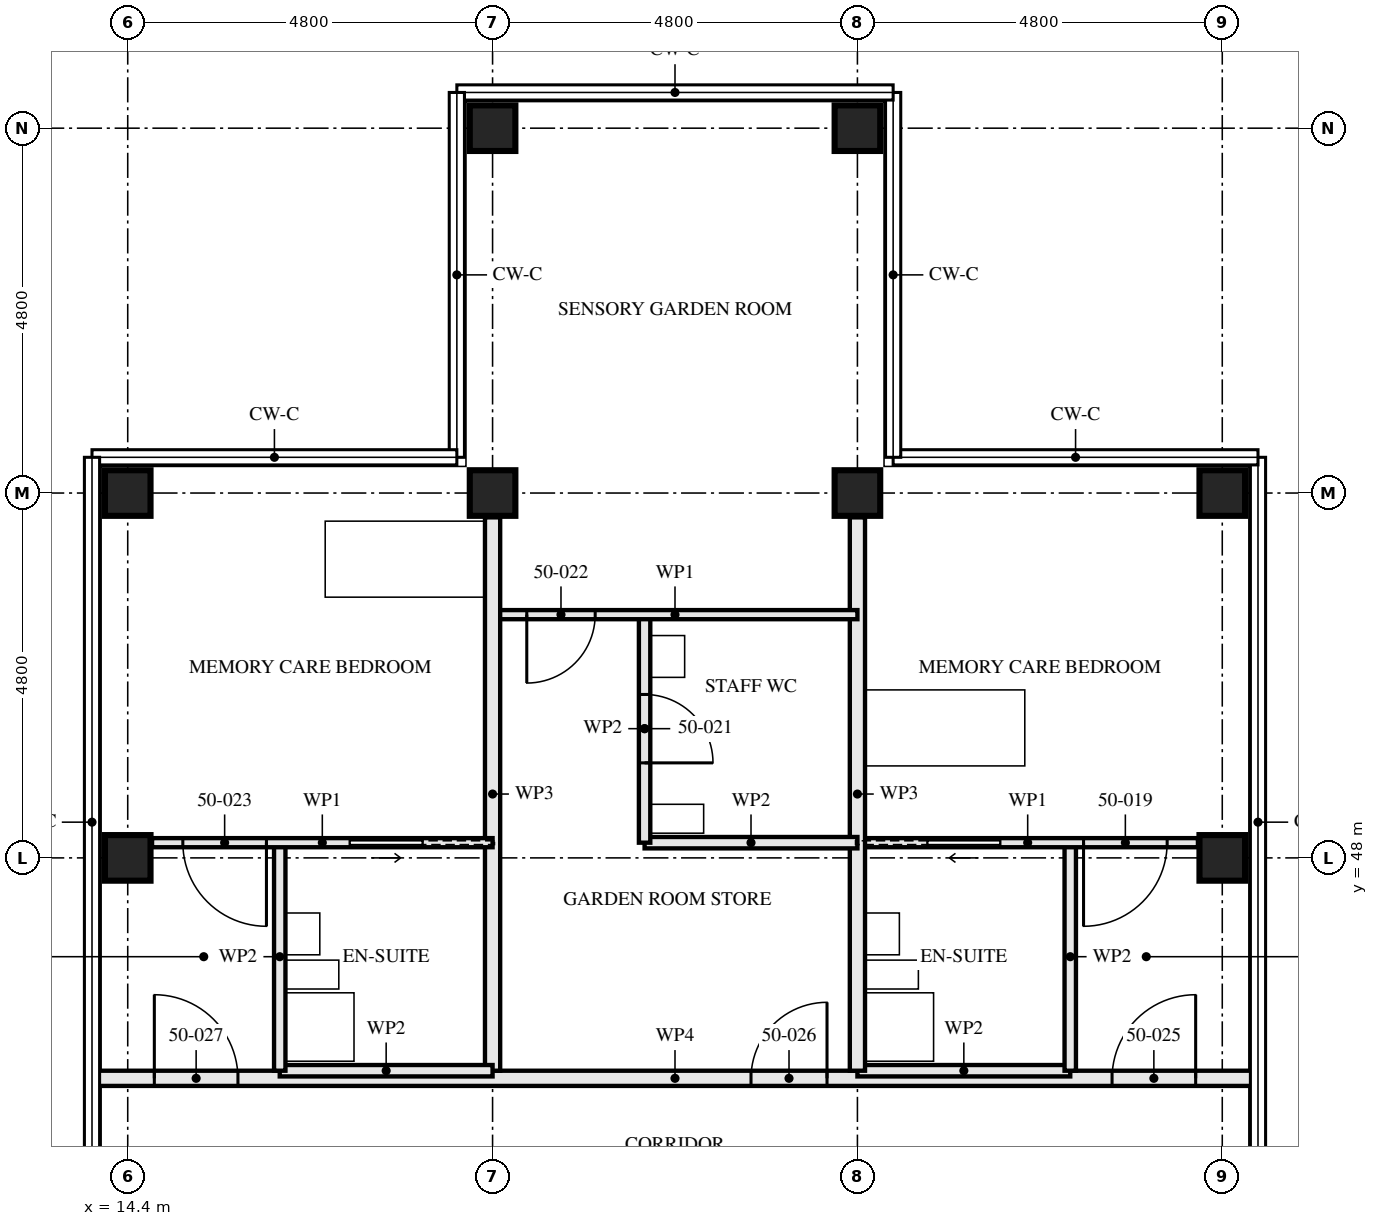
"""IFC4 building model, lengths in metres.
Left out: names, types, materials, properties, quantities, classifications, styles, units other than length and angle.
Written with IfcOpenShell. Run it as: python <this file> out.ifc"""

import sys

from ifc_helpers import new_model, si_unit, direction, frame, frame_2d, origin, origin_2d, place, context, subcontext, project, spatial, rectangle, hollow_rectangle, extrude, element, fill, save


model = new_model("IFC4")
c1 = context("Model", 3, precision=1e-05, world=origin(), true_north=direction((0.0, 1.0)))
c2 = subcontext(c1, "Body", "Model", "MODEL_VIEW")
j1 = project(units=[si_unit("LENGTHUNIT", "METRE"), si_unit("PLANEANGLEUNIT", "RADIAN")], contexts=[c1])
p1 = place(None, origin())
s1 = spatial("IfcSite", under=j1, at=p1, CompositionType="ELEMENT")
p2 = place(p1, origin())
s2 = spatial("IfcBuilding", under=s1, at=p2, CompositionType="ELEMENT")
p3 = place(p2, frame((0.0, 0.0, 183.0)))
s3 = spatial("IfcBuildingStorey", under=s2, at=p3, CompositionType="ELEMENT", Elevation=183.0)
for number, where, z_axis, x_axis in (
    (1, (14.4, 48.0, 0.0), (0.0, 0.0, 1.0), (1.0, 0.0, 0.0)),
    (2, (14.4, 52.8, 0.0), (0.0, 0.0, 1.0), (0.0, 1.0, 0.0)),
    (3, (19.2, 52.8, 0.0), (0.0, 0.0, 1.0), (0.0, 1.0, 0.0)),
    (4, (19.2, 57.6, 0.0), (0.0, 0.0, 1.0), (0.0, 1.0, 0.0)),
    (5, (24.0, 52.8, 0.0), (0.0, 0.0, 1.0), (0.0, 1.0, 0.0)),
    (6, (24.0, 57.6, 0.0), (0.0, 0.0, 1.0), (0.0, 1.0, 0.0)),
    (7, (28.8, 48.0, 0.0), (0.0, 0.0, 1.0), (1.0, 0.0, 0.0)),
    (8, (28.8, 52.8, 0.0), (0.0, 0.0, 1.0), (0.0, 1.0, 0.0)),
):
    element("IfcColumn", number, at=place(p3, frame(where, z_axis=z_axis, x_axis=x_axis)), inside=s3, PredefinedType="COLUMN", context=c2, shape_type="SweptSolid", body=[
        extrude(hollow_rectangle(XDim=0.6, YDim=0.6, WallThickness=0.08, at=origin_2d()), origin(), (0.0, 0.0, 1.0), 3.5),
    ])
p4 = place(p3, frame((26.8, 48.2, 0.0), z_axis=(0.0, 0.0, 1.0), x_axis=(0.0, -1.0, 0.0)))
e9 = element("IfcWall", 9, at=p4, inside=s3, PredefinedType="PARTITIONING", context=c2, shape_type="SweptSolid", body=[
    extrude(rectangle(XDim=3.0, YDim=0.15, at=frame_2d((1.5, 0.0))), origin(), (0.0, 0.0, 1.0), 2.55),
])
p5 = place(p3, frame((26.8, 45.2, 0.0), z_axis=(0.0, 0.0, 1.0), x_axis=(-1.0, 0.0, 0.0)))
e10 = element("IfcWall", 10, at=p5, inside=s3, PredefinedType="PARTITIONING", context=c2, shape_type="SweptSolid", body=[
    extrude(rectangle(XDim=2.8, YDim=0.15, at=frame_2d((1.4, 0.0))), origin(), (0.0, 0.0, 1.0), 3.33),
])
p6 = place(p3, frame((28.48, 48.2, 0.0), z_axis=(0.0, 0.0, 1.0), x_axis=(-1.0, 0.0, 0.0)))
e11 = element("IfcWall", 11, at=p6, inside=s3, PredefinedType="PARTITIONING", context=c2, shape_type="SweptSolid", body=[
    extrude(rectangle(XDim=4.48, YDim=0.12, at=frame_2d((2.24, 0.0))), origin(), (0.0, 0.0, 1.0), 3.33),
])
p7 = place(p6, frame((0.405, 0.0, 0.0)))
e12 = element("IfcOpeningElement", 12, at=p7, cuts=e11, PredefinedType="OPENING", context=c2, shape_type="SweptSolid", body=[
    extrude(rectangle(XDim=1.1, YDim=2.1, at=frame_2d((0.55, 1.05))), frame((0.0, 0.071, 0.0), z_axis=(0.0, -1.0, 0.0), x_axis=(1.0, 0.0, 0.0)), (0.0, 0.0, 1.0), 0.141),
])
p8 = place(p6, frame((2.605, 0.0, 0.0)))
e13 = element("IfcOpeningElement", 13, at=p8, cuts=e11, PredefinedType="OPENING", context=c2, shape_type="SweptSolid", body=[
    extrude(rectangle(XDim=0.95, YDim=2.1, at=frame_2d((0.475, 1.05))), frame((0.0, 0.071, 0.0), z_axis=(0.0, -1.0, 0.0), x_axis=(1.0, 0.0, 0.0)), (0.0, 0.0, 1.0), 0.141),
])
p9 = place(p3, frame((24.0, 52.48, 0.0), z_axis=(0.0, 0.0, 1.0), x_axis=(0.0, -1.0, 0.0)))
e14 = element("IfcWall", 14, at=p9, inside=s3, PredefinedType="PARTITIONING", context=c2, shape_type="SweptSolid", body=[
    extrude(rectangle(XDim=7.28, YDim=0.2, at=frame_2d((3.64, 0.0))), origin(), (0.0, 0.0, 1.0), 2.55),
])
p10 = place(p3, frame((21.2, 51.2, 0.0), z_axis=(0.0, 0.0, 1.0), x_axis=(0.0, -1.0, 0.0)))
e15 = element("IfcWall", 15, at=p10, inside=s3, PredefinedType="PARTITIONING", context=c2, shape_type="SweptSolid", body=[
    extrude(rectangle(XDim=3.0, YDim=0.15, at=frame_2d((1.5, 0.0))), origin(), (0.0, 0.0, 1.0), 3.33),
])
p11 = place(p10, frame((1.05, 0.0, 0.0)))
e16 = element("IfcOpeningElement", 16, at=p11, cuts=e15, PredefinedType="OPENING", context=c2, shape_type="SweptSolid", body=[
    extrude(rectangle(XDim=0.9, YDim=2.1, at=frame_2d((0.45, 1.05))), frame((0.0, 0.085, 0.0), z_axis=(0.0, -1.0, 0.0), x_axis=(1.0, 0.0, 0.0)), (0.0, 0.0, 1.0), 0.171),
])
p12 = place(p3, frame((24.0, 48.2, 0.0), z_axis=(0.0, 0.0, 1.0), x_axis=(-1.0, 0.0, 0.0)))
e17 = element("IfcWall", 17, at=p12, inside=s3, PredefinedType="PARTITIONING", context=c2, shape_type="SweptSolid", body=[
    extrude(rectangle(XDim=2.8, YDim=0.15, at=frame_2d((1.4, 0.0))), origin(), (0.0, 0.0, 1.0), 3.33),
])
p13 = place(p3, frame((24.0, 51.2, 0.0), z_axis=(0.0, 0.0, 1.0), x_axis=(-1.0, 0.0, 0.0)))
e18 = element("IfcWall", 18, at=p13, inside=s3, PredefinedType="PARTITIONING", context=c2, shape_type="SweptSolid", body=[
    extrude(rectangle(XDim=4.8, YDim=0.12, at=frame_2d((2.4, 0.0))), origin(), (0.0, 0.0, 1.0), 3.33),
])
p14 = place(p13, frame((3.45, 0.0, 0.0)))
e19 = element("IfcOpeningElement", 19, at=p14, cuts=e18, PredefinedType="OPENING", context=c2, shape_type="SweptSolid", body=[
    extrude(rectangle(XDim=0.9, YDim=2.1, at=frame_2d((0.45, 1.05))), frame((0.0, 0.071, 0.0), z_axis=(0.0, -1.0, 0.0), x_axis=(1.0, 0.0, 0.0)), (0.0, 0.0, 1.0), 0.141),
])
p15 = place(p3, frame((19.2, 52.48, 0.0), z_axis=(0.0, 0.0, 1.0), x_axis=(0.0, -1.0, 0.0)))
e20 = element("IfcWall", 20, at=p15, inside=s3, PredefinedType="PARTITIONING", context=c2, shape_type="SweptSolid", body=[
    extrude(rectangle(XDim=7.28, YDim=0.2, at=frame_2d((3.64, 0.0))), origin(), (0.0, 0.0, 1.0), 2.55),
])
p16 = place(p3, frame((16.4, 48.2, 0.0), z_axis=(0.0, 0.0, 1.0), x_axis=(0.0, -1.0, 0.0)))
e21 = element("IfcWall", 21, at=p16, inside=s3, PredefinedType="PARTITIONING", context=c2, shape_type="SweptSolid", body=[
    extrude(rectangle(XDim=3.0, YDim=0.15, at=frame_2d((1.5, 0.0))), origin(), (0.0, 0.0, 1.0), 2.55),
])
p17 = place(p3, frame((19.2, 45.2, 0.0), z_axis=(0.0, 0.0, 1.0), x_axis=(-1.0, 0.0, 0.0)))
e22 = element("IfcWall", 22, at=p17, inside=s3, PredefinedType="PARTITIONING", context=c2, shape_type="SweptSolid", body=[
    extrude(rectangle(XDim=2.8, YDim=0.15, at=frame_2d((1.4, 0.0))), origin(), (0.0, 0.0, 1.0), 3.33),
])
p18 = place(p3, frame((19.2, 48.2, 0.0), z_axis=(0.0, 0.0, 1.0), x_axis=(-1.0, 0.0, 0.0)))
e23 = element("IfcWall", 23, at=p18, inside=s3, PredefinedType="PARTITIONING", context=c2, shape_type="SweptSolid", body=[
    extrude(rectangle(XDim=4.48, YDim=0.12, at=frame_2d((2.24, 0.0))), origin(), (0.0, 0.0, 1.0), 3.33),
])
p19 = place(p18, frame((2.975, 0.0, 0.0)))
e24 = element("IfcOpeningElement", 24, at=p19, cuts=e23, PredefinedType="OPENING", context=c2, shape_type="SweptSolid", body=[
    extrude(rectangle(XDim=1.1, YDim=2.1, at=frame_2d((0.55, 1.05))), frame((0.0, 0.071, 0.0), z_axis=(0.0, -1.0, 0.0), x_axis=(1.0, 0.0, 0.0)), (0.0, 0.0, 1.0), 0.141),
])
p20 = place(p18, frame((0.925, 0.0, 0.0)))
e25 = element("IfcOpeningElement", 25, at=p20, cuts=e23, PredefinedType="OPENING", context=c2, shape_type="SweptSolid", body=[
    extrude(rectangle(XDim=0.95, YDim=2.1, at=frame_2d((0.475, 1.05))), frame((0.0, 0.071, 0.0), z_axis=(0.0, -1.0, 0.0), x_axis=(1.0, 0.0, 0.0)), (0.0, 0.0, 1.0), 0.141),
])
p21 = place(p3, frame((29.25, 45.1, 0.0), z_axis=(0.0, 0.0, 1.0), x_axis=(-1.0, 0.0, 0.0)))
e26 = element("IfcWall", 26, at=p21, inside=s3, PredefinedType="PARTITIONING", context=c2, shape_type="SweptSolid", body=[
    extrude(rectangle(XDim=15.3, YDim=0.2, at=frame_2d((7.65, 0.0))), origin(), (0.0, 0.0, 1.0), 2.32),
])
p22 = place(p21, frame((0.8, 0.0, 0.0)))
e27 = element("IfcOpeningElement", 27, at=p22, cuts=e26, PredefinedType="OPENING", context=c2, shape_type="SweptSolid", body=[
    extrude(rectangle(XDim=1.1, YDim=2.1, at=frame_2d((0.55, 1.05))), frame((0.0, 0.111, 0.0), z_axis=(0.0, -1.0, 0.0), x_axis=(1.0, 0.0, 0.0)), (0.0, 0.0, 1.0), 0.221),
])
p23 = place(p21, frame((5.65, 0.0, 0.0)))
e28 = element("IfcOpeningElement", 28, at=p23, cuts=e26, PredefinedType="OPENING", context=c2, shape_type="SweptSolid", body=[
    extrude(rectangle(XDim=1.0, YDim=2.1, at=frame_2d((0.5, 1.05))), frame((0.0, 0.111, 0.0), z_axis=(0.0, -1.0, 0.0), x_axis=(1.0, 0.0, 0.0)), (0.0, 0.0, 1.0), 0.221),
])
p24 = place(p21, frame((13.4, 0.0, 0.0)))
e29 = element("IfcOpeningElement", 29, at=p24, cuts=e26, PredefinedType="OPENING", context=c2, shape_type="SweptSolid", body=[
    extrude(rectangle(XDim=1.1, YDim=2.1, at=frame_2d((0.55, 1.05))), frame((0.0, 0.111, 0.0), z_axis=(0.0, -1.0, 0.0), x_axis=(1.0, 0.0, 0.0)), (0.0, 0.0, 1.0), 0.221),
])
p25 = place(p7, origin())
e30 = element("IfcDoor", 30, at=p25, inside=s3, OperationType="SINGLE_SWING_LEFT", PredefinedType="DOOR", context=c2, shape_type="SweptSolid", body=[
    extrude(rectangle(XDim=1.1, YDim=2.1, at=frame_2d((0.55, 1.05))), frame((0.0, 0.022, 0.0), z_axis=(0.0, -1.0, 0.0), x_axis=(1.0, 0.0, 0.0)), (0.0, 0.0, 1.0), 0.044),
])
fill(e12, e30)
p26 = place(p8, origin())
e31 = element("IfcDoor", 31, at=p26, inside=s3, OperationType="SLIDING_TO_LEFT", PredefinedType="DOOR", context=c2, shape_type="SweptSolid", body=[
    extrude(rectangle(XDim=0.95, YDim=2.1, at=frame_2d((0.475, 1.05))), frame((0.0, 0.022, 0.0), z_axis=(0.0, -1.0, 0.0), x_axis=(1.0, 0.0, 0.0)), (0.0, 0.0, 1.0), 0.044),
])
fill(e13, e31)
p27 = place(p11, origin())
e32 = element("IfcDoor", 32, at=p27, inside=s3, OperationType="SINGLE_SWING_LEFT", PredefinedType="DOOR", context=c2, shape_type="SweptSolid", body=[
    extrude(rectangle(XDim=0.9, YDim=2.1, at=frame_2d((0.45, 1.05))), frame((0.0, 0.022, 0.0), z_axis=(0.0, -1.0, 0.0), x_axis=(1.0, 0.0, 0.0)), (0.0, 0.0, 1.0), 0.044),
])
fill(e16, e32)
p28 = place(p14, origin())
e33 = element("IfcDoor", 33, at=p28, inside=s3, OperationType="SINGLE_SWING_LEFT", PredefinedType="DOOR", context=c2, shape_type="SweptSolid", body=[
    extrude(rectangle(XDim=0.9, YDim=2.1, at=frame_2d((0.45, 1.05))), frame((0.0, 0.022, 0.0), z_axis=(0.0, -1.0, 0.0), x_axis=(1.0, 0.0, 0.0)), (0.0, 0.0, 1.0), 0.044),
])
fill(e19, e33)
p29 = place(p19, origin())
e34 = element("IfcDoor", 34, at=p29, inside=s3, OperationType="SINGLE_SWING_RIGHT", PredefinedType="DOOR", context=c2, shape_type="SweptSolid", body=[
    extrude(rectangle(XDim=1.1, YDim=2.1, at=frame_2d((0.55, 1.05))), frame((0.0, 0.022, 0.0), z_axis=(0.0, -1.0, 0.0), x_axis=(1.0, 0.0, 0.0)), (0.0, 0.0, 1.0), 0.044),
])
fill(e24, e34)
p30 = place(p20, origin())
e35 = element("IfcDoor", 35, at=p30, inside=s3, OperationType="SLIDING_TO_RIGHT", PredefinedType="DOOR", context=c2, shape_type="SweptSolid", body=[
    extrude(rectangle(XDim=0.95, YDim=2.1, at=frame_2d((0.475, 1.05))), frame((0.0, 0.022, 0.0), z_axis=(0.0, -1.0, 0.0), x_axis=(1.0, 0.0, 0.0)), (0.0, 0.0, 1.0), 0.044),
])
fill(e25, e35)
p31 = place(p22, frame((1.1, 0.0, 0.0), z_axis=(0.0, 0.0, 1.0), x_axis=(-1.0, 0.0, 0.0)))
e36 = element("IfcDoor", 36, at=p31, inside=s3, OperationType="SINGLE_SWING_LEFT", PredefinedType="DOOR", context=c2, shape_type="SweptSolid", body=[
    extrude(rectangle(XDim=1.1, YDim=2.1, at=frame_2d((0.55, 1.05))), frame((0.0, 0.027, 0.0), z_axis=(0.0, -1.0, 0.0), x_axis=(1.0, 0.0, 0.0)), (0.0, 0.0, 1.0), 0.054),
])
fill(e27, e36)
p32 = place(p23, frame((1.0, 0.0, 0.0), z_axis=(0.0, 0.0, 1.0), x_axis=(-1.0, 0.0, 0.0)))
e37 = element("IfcDoor", 37, at=p32, inside=s3, OperationType="SINGLE_SWING_LEFT", PredefinedType="DOOR", context=c2, shape_type="SweptSolid", body=[
    extrude(rectangle(XDim=1.0, YDim=2.1, at=frame_2d((0.5, 1.05))), frame((0.0, 0.027, 0.0), z_axis=(0.0, -1.0, 0.0), x_axis=(1.0, 0.0, 0.0)), (0.0, 0.0, 1.0), 0.054),
])
fill(e28, e37)
p33 = place(p24, frame((1.1, 0.0, 0.0), z_axis=(0.0, 0.0, 1.0), x_axis=(-1.0, 0.0, 0.0)))
e38 = element("IfcDoor", 38, at=p33, inside=s3, OperationType="SINGLE_SWING_RIGHT", PredefinedType="DOOR", context=c2, shape_type="SweptSolid", body=[
    extrude(rectangle(XDim=1.1, YDim=2.1, at=frame_2d((0.55, 1.05))), frame((0.0, 0.027, 0.0), z_axis=(0.0, -1.0, 0.0), x_axis=(1.0, 0.0, 0.0)), (0.0, 0.0, 1.0), 0.054),
])
fill(e29, e38)
save(model, sys.argv[1])
